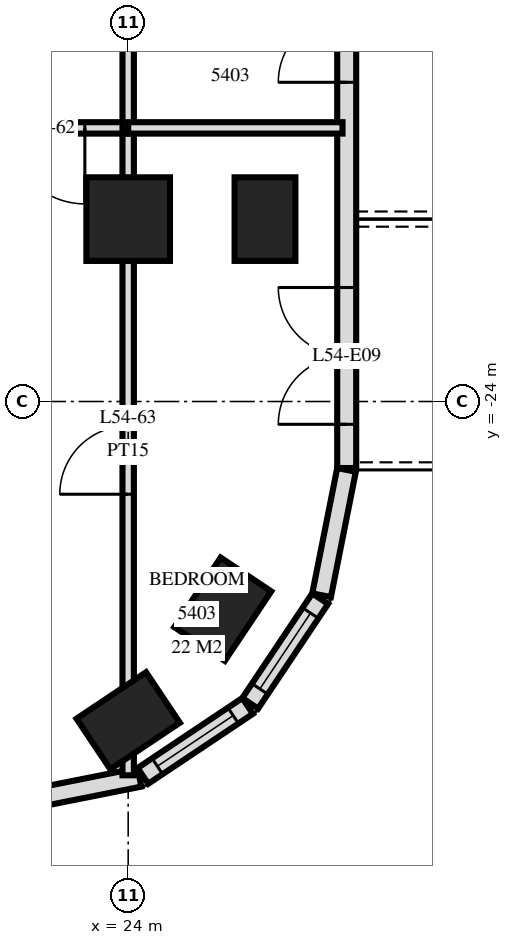
"""IFC4 building model, lengths in metres.
Left out: names, types, materials, properties, quantities, classifications, styles, units other than length and angle.
Written with IfcOpenShell. Run it as: python <this file> out.ifc"""

import sys

from ifc_helpers import new_model, si_unit, direction, frame, frame_2d, origin, origin_2d, place, context, subcontext, project, spatial, rectangle, extrude, element, fill, save


model = new_model("IFC4")
c1 = context("Model", 3, precision=1e-05, world=origin(), true_north=direction((0.0, 1.0)))
c2 = subcontext(c1, "Body", "Model", "MODEL_VIEW")
j1 = project(units=[si_unit("LENGTHUNIT", "METRE"), si_unit("PLANEANGLEUNIT", "RADIAN")], contexts=[c1])
p1 = place(None, origin())
s1 = spatial("IfcSite", under=j1, at=p1, CompositionType="ELEMENT")
p2 = place(p1, origin())
s2 = spatial("IfcBuilding", under=s1, at=p2, CompositionType="ELEMENT")
p3 = place(p2, frame((0.0, 0.0, 208.1)))
s3 = spatial("IfcBuildingStorey", under=s2, at=p3, CompositionType="ELEMENT", Elevation=208.1)
p4 = place(p3, frame((24.0, -28.2, 0.0), z_axis=(0.0, 0.0, 1.0), x_axis=(0.831459915646, 0.555584744817, 0.0)))
e1 = element("IfcColumn", 1, at=p4, inside=s3, PredefinedType="COLUMN", context=c2, shape_type="SweptSolid", body=[
    extrude(rectangle(XDim=1.1, YDim=0.8, at=origin_2d()), origin(), (0.0, 0.0, 1.0), 3.5),
])
p5 = place(p3, frame((24.0, -21.6, 0.0), z_axis=(0.0, 0.0, 1.0), x_axis=(1.0, 0.0, 0.0)))
e2 = element("IfcColumn", 2, at=p5, inside=s3, PredefinedType="COLUMN", context=c2, shape_type="SweptSolid", body=[
    extrude(rectangle(XDim=1.1, YDim=1.1, at=origin_2d()), origin(), (0.0, 0.0, 1.0), 3.5),
])
for number, where, z_axis, x_axis in (
    (3, (25.244, -26.733, 0.0), (0.0, 0.0, 1.0), (0.556, 0.831, 0.0)),
    (4, (25.8, -21.6, 0.0), (0.0, 0.0, 1.0), (0.0, 1.0, 0.0)),
):
    element("IfcColumn", number, at=place(p3, frame(where, z_axis=z_axis, x_axis=x_axis)), inside=s3, PredefinedType="COLUMN", context=c2, shape_type="SweptSolid", body=[
        extrude(rectangle(XDim=1.1, YDim=0.8, at=origin_2d()), origin(), (0.0, 0.0, 1.0), 3.5),
    ])
p6 = place(p3, frame((22.5, -29.273, 0.0), z_axis=(0.0, 0.0, 1.0), x_axis=(0.980775640221, 0.19513878023, 0.0)))
e5 = element("IfcWall", 5, at=p6, inside=s3, PredefinedType="SOLIDWALL", context=c2, shape_type="SweptSolid", body=[
    extrude(rectangle(XDim=1.681, YDim=0.25, at=frame_2d((0.841, 0.0))), origin(), (0.0, 0.0, 1.0), 3.22),
])
p7 = place(p3, frame((24.194, -28.926, 0.0), z_axis=(0.0, 0.0, 1.0), x_axis=(0.831482937015, 0.55555029066, 0.0)))
e6 = element("IfcWall", 6, at=p7, inside=s3, PredefinedType="SOLIDWALL", context=c2, shape_type="SweptSolid", body=[
    extrude(rectangle(XDim=1.656, YDim=0.25, at=frame_2d((0.828, 0.0))), origin(), (0.0, 0.0, 1.0), 3.22),
])
p8 = place(p7, frame((0.228, 0.0, 0.9)))
e7 = element("IfcOpeningElement", 7, at=p8, cuts=e6, PredefinedType="OPENING", context=c2, shape_type="SweptSolid", body=[
    extrude(rectangle(XDim=1.2, YDim=1.5, at=frame_2d((0.6, 0.75))), frame((0.0, 0.135, 0.0), z_axis=(0.0, -1.0, 0.0), x_axis=(1.0, 0.0, 0.0)), (0.0, 0.0, 1.0), 0.27),
])
p9 = place(p3, frame((25.606, -27.971, 0.0), z_axis=(0.0, 0.0, 1.0), x_axis=(0.55555029066, 0.831482937015, 0.0)))
e8 = element("IfcWall", 8, at=p9, inside=s3, PredefinedType="SOLIDWALL", context=c2, shape_type="SweptSolid", body=[
    extrude(rectangle(XDim=1.656, YDim=0.25, at=frame_2d((0.828, 0.0))), origin(), (0.0, 0.0, 1.0), 3.22),
])
p10 = place(p9, frame((0.228, 0.0, 0.9)))
e9 = element("IfcOpeningElement", 9, at=p10, cuts=e8, PredefinedType="OPENING", context=c2, shape_type="SweptSolid", body=[
    extrude(rectangle(XDim=1.2, YDim=1.5, at=frame_2d((0.6, 0.75))), frame((0.0, 0.135, 0.0), z_axis=(0.0, -1.0, 0.0), x_axis=(1.0, 0.0, 0.0)), (0.0, 0.0, 1.0), 0.27),
])
p11 = place(p3, frame((26.545, -26.549, 0.0), z_axis=(0.0, 0.0, 1.0), x_axis=(0.195026884138, 0.980797896849, 0.0)))
e10 = element("IfcWall", 10, at=p11, inside=s3, PredefinedType="SOLIDWALL", context=c2, shape_type="SweptSolid", body=[
    extrude(rectangle(XDim=1.681, YDim=0.25, at=frame_2d((0.841, 0.0))), origin(), (0.0, 0.0, 1.0), 3.22),
])
p12 = place(p3, frame((26.875, -24.875, 0.0), z_axis=(0.0, 0.0, 1.0), x_axis=(0.0, 1.0, 0.0)))
e11 = element("IfcWall", 11, at=p12, inside=s3, PredefinedType="SOLIDWALL", context=c2, shape_type="SweptSolid", body=[
    extrude(rectangle(XDim=21.551, YDim=0.25, at=frame_2d((10.775, 0.0))), origin(), (0.0, 0.0, 1.0), 3.22),
])
p13 = place(p12, frame((0.575, 0.0, 0.0)))
e12 = element("IfcOpeningElement", 12, at=p13, cuts=e11, PredefinedType="OPENING", context=c2, shape_type="SweptSolid", body=[
    extrude(rectangle(XDim=1.8, YDim=2.4, at=frame_2d((0.9, 1.2))), frame((0.0, 0.135, 0.0), z_axis=(0.0, -1.0, 0.0), x_axis=(1.0, 0.0, 0.0)), (0.0, 0.0, 1.0), 0.27),
])
p14 = place(p12, frame((5.075, 0.0, 0.0)))
e13 = element("IfcOpeningElement", 13, at=p14, cuts=e11, PredefinedType="OPENING", context=c2, shape_type="SweptSolid", body=[
    extrude(rectangle(XDim=1.8, YDim=2.4, at=frame_2d((0.9, 1.2))), frame((0.0, 0.135, 0.0), z_axis=(0.0, -1.0, 0.0), x_axis=(1.0, 0.0, 0.0)), (0.0, 0.0, 1.0), 0.27),
])
p15 = place(p12, frame((8.075, 0.0, 0.9)))
e14 = element("IfcOpeningElement", 14, at=p15, cuts=e11, PredefinedType="OPENING", context=c2, shape_type="SweptSolid", body=[
    extrude(rectangle(XDim=1.2, YDim=1.5, at=frame_2d((0.6, 0.75))), frame((0.0, 0.135, 0.0), z_axis=(0.0, -1.0, 0.0), x_axis=(1.0, 0.0, 0.0)), (0.0, 0.0, 1.0), 0.27),
])
p16 = place(p12, frame((13.1, 0.0, 0.0)))
e15 = element("IfcOpeningElement", 15, at=p16, cuts=e11, PredefinedType="OPENING", context=c2, shape_type="SweptSolid", body=[
    extrude(rectangle(XDim=1.8, YDim=2.4, at=frame_2d((0.9, 1.2))), frame((0.0, 0.135, 0.0), z_axis=(0.0, -1.0, 0.0), x_axis=(1.0, 0.0, 0.0)), (0.0, 0.0, 1.0), 0.27),
])
p17 = place(p3, frame((24.0, -20.4, 0.0), z_axis=(0.0, 0.0, 1.0), x_axis=(0.0, 1.0, 0.0)))
e16 = element("IfcWall", 16, at=p17, inside=s3, PredefinedType="PARTITIONING", context=c2, shape_type="SweptSolid", body=[
    extrude(rectangle(XDim=3.0, YDim=0.15, at=frame_2d((1.5, 0.0))), origin(), (0.0, 0.0, 1.0), 3.22),
])
p18 = place(p17, frame((1.02, 0.0, 0.0)))
e17 = element("IfcOpeningElement", 17, at=p18, cuts=e16, PredefinedType="OPENING", context=c2, shape_type="SweptSolid", body=[
    extrude(rectangle(XDim=1.0, YDim=2.1, at=frame_2d((0.5, 1.05))), frame((0.0, 0.085, 0.0), z_axis=(0.0, -1.0, 0.0), x_axis=(1.0, 0.0, 0.0)), (0.0, 0.0, 1.0), 0.17),
])
p19 = place(p3, frame((24.0, -28.918, 0.0), z_axis=(0.0, 0.0, 1.0), x_axis=(0.0, 1.0, 0.0)))
e18 = element("IfcWall", 18, at=p19, inside=s3, PredefinedType="PARTITIONING", context=c2, shape_type="SweptSolid", body=[
    extrude(rectangle(XDim=8.518, YDim=0.15, at=frame_2d((4.259, 0.0))), origin(), (0.0, 0.0, 1.0), 3.22),
])
p20 = place(p19, frame((3.698, 0.0, 0.0)))
e19 = element("IfcOpeningElement", 19, at=p20, cuts=e18, PredefinedType="OPENING", context=c2, shape_type="SweptSolid", body=[
    extrude(rectangle(XDim=0.9, YDim=2.1, at=frame_2d((0.45, 1.05))), frame((0.0, 0.085, 0.0), z_axis=(0.0, -1.0, 0.0), x_axis=(1.0, 0.0, 0.0)), (0.0, 0.0, 1.0), 0.17),
])
p21 = place(p3, frame((22.2, -20.4, 0.0), z_axis=(0.0, 0.0, 1.0), x_axis=(1.0, 0.0, 0.0)))
e20 = element("IfcWall", 20, at=p21, inside=s3, PredefinedType="PARTITIONING", context=c2, shape_type="SweptSolid", body=[
    extrude(rectangle(XDim=1.8, YDim=0.15, at=frame_2d((0.9, 0.0))), origin(), (0.0, 0.0, 1.0), 3.22),
])
p22 = place(p21, frame((0.23, 0.0, 0.0)))
e21 = element("IfcOpeningElement", 21, at=p22, cuts=e20, PredefinedType="OPENING", context=c2, shape_type="SweptSolid", body=[
    extrude(rectangle(XDim=1.0, YDim=2.1, at=frame_2d((0.5, 1.05))), frame((0.0, 0.085, 0.0), z_axis=(0.0, -1.0, 0.0), x_axis=(1.0, 0.0, 0.0)), (0.0, 0.0, 1.0), 0.17),
])
p23 = place(p3, frame((24.0, -20.4, 0.0), z_axis=(0.0, 0.0, 1.0), x_axis=(1.0, 0.0, 0.0)))
e22 = element("IfcWall", 22, at=p23, inside=s3, PredefinedType="PARTITIONING", context=c2, shape_type="SweptSolid", body=[
    extrude(rectangle(XDim=2.82, YDim=0.15, at=frame_2d((1.41, 0.0))), origin(), (0.0, 0.0, 1.0), 3.22),
])
p24 = place(p8, origin())
e23 = element("IfcWindow", 23, at=p24, inside=s3, PartitioningType="SINGLE_PANEL", PredefinedType="WINDOW", context=c2, shape_type="SweptSolid", body=[
    extrude(rectangle(XDim=1.2, YDim=1.5, at=frame_2d((0.6, 0.75))), frame((0.0, 0.03, 0.0), z_axis=(0.0, -1.0, 0.0), x_axis=(1.0, 0.0, 0.0)), (0.0, 0.0, 1.0), 0.06),
])
fill(e7, e23)
p25 = place(p10, origin())
e24 = element("IfcWindow", 24, at=p25, inside=s3, PartitioningType="SINGLE_PANEL", PredefinedType="WINDOW", context=c2, shape_type="SweptSolid", body=[
    extrude(rectangle(XDim=1.2, YDim=1.5, at=frame_2d((0.6, 0.75))), frame((0.0, 0.03, 0.0), z_axis=(0.0, -1.0, 0.0), x_axis=(1.0, 0.0, 0.0)), (0.0, 0.0, 1.0), 0.06),
])
fill(e9, e24)
p26 = place(p13, origin())
e25 = element("IfcDoor", 25, at=p26, inside=s3, OperationType="DOUBLE_DOOR_SINGLE_SWING", PredefinedType="DOOR", context=c2, shape_type="SweptSolid", body=[
    extrude(rectangle(XDim=1.8, YDim=2.4, at=frame_2d((0.9, 1.2))), frame((0.0, 0.025, 0.0), z_axis=(0.0, -1.0, 0.0), x_axis=(1.0, 0.0, 0.0)), (0.0, 0.0, 1.0), 0.05),
])
fill(e12, e25)
p27 = place(p14, origin())
e26 = element("IfcDoor", 26, at=p27, inside=s3, OperationType="DOUBLE_DOOR_SINGLE_SWING", PredefinedType="DOOR", context=c2, shape_type="SweptSolid", body=[
    extrude(rectangle(XDim=1.8, YDim=2.4, at=frame_2d((0.9, 1.2))), frame((0.0, 0.025, 0.0), z_axis=(0.0, -1.0, 0.0), x_axis=(1.0, 0.0, 0.0)), (0.0, 0.0, 1.0), 0.05),
])
fill(e13, e26)
p28 = place(p22, frame((0.5, 0.0, 0.0), z_axis=(0.0, 0.0, 1.0), x_axis=(-1.0, 0.0, 0.0)))
e27 = element("IfcDoor", 27, at=p28, inside=s3, OperationType="SINGLE_SWING_RIGHT", PredefinedType="DOOR", context=c2, shape_type="SweptSolid", body=[
    extrude(rectangle(XDim=1.0, YDim=2.1, at=frame_2d((0.0, 1.05))), frame((0.0, -0.025, 0.0), z_axis=(0.0, 1.0, 0.0), x_axis=(-1.0, 0.0, 0.0)), (0.0, 0.0, 1.0), 0.05),
])
fill(e21, e27)
p29 = place(p20, origin())
e28 = element("IfcDoor", 28, at=p29, inside=s3, OperationType="SINGLE_SWING_RIGHT", PredefinedType="DOOR", context=c2, shape_type="SweptSolid", body=[
    extrude(rectangle(XDim=0.9, YDim=2.1, at=frame_2d((0.45, 1.05))), frame((0.0, 0.025, 0.0), z_axis=(0.0, -1.0, 0.0), x_axis=(1.0, 0.0, 0.0)), (0.0, 0.0, 1.0), 0.05),
])
fill(e19, e28)
save(model, sys.argv[1])
